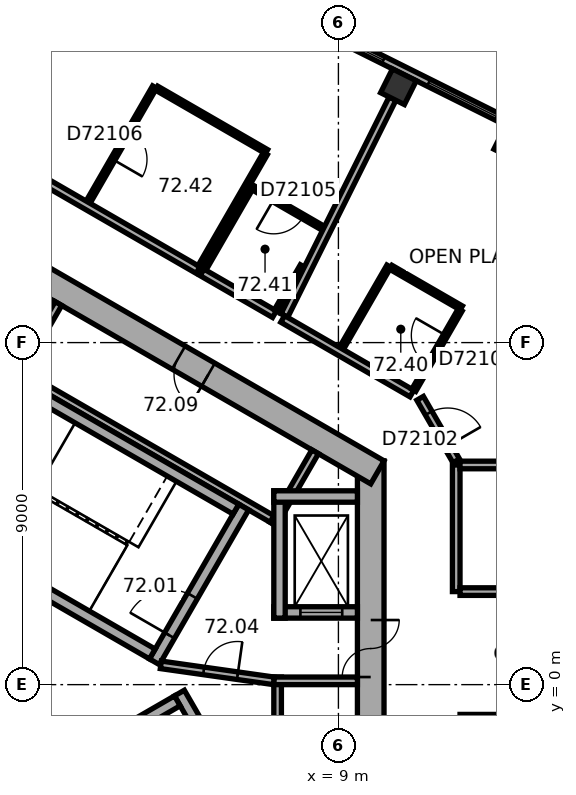
"""IFC4 building model, lengths in metres.
Left out: names, types, materials, properties, quantities, classifications, styles, units other than length and angle.
Written with IfcOpenShell. Run it as: python <this file> out.ifc"""

import sys

from ifc_helpers import new_model, si_unit, direction, frame, frame_2d, origin, origin_2d, place, context, subcontext, project, spatial, rectangle, extrude, element, fill, save


model = new_model("IFC4")
c1 = context("Model", 3, precision=1e-05, world=origin(), true_north=direction((0.0, 1.0)))
c2 = subcontext(c1, "Body", "Model", "MODEL_VIEW")
j1 = project(units=[si_unit("LENGTHUNIT", "METRE"), si_unit("PLANEANGLEUNIT", "RADIAN")], contexts=[c1])
p1 = place(None, origin())
s1 = spatial("IfcSite", under=j1, at=p1, CompositionType="ELEMENT")
p2 = place(p1, origin())
s2 = spatial("IfcBuilding", under=s1, at=p2, CompositionType="ELEMENT")
p3 = place(p2, frame((0.0, 0.0, 293.1)))
s3 = spatial("IfcBuildingStorey", under=s2, at=p3, CompositionType="ELEMENT", Elevation=293.1)
for number, where, z_axis, x_axis in (
    (1, (13.561, 14.246, 0.0), (0.0, 0.0, 1.0), (-0.895, 0.446, 0.0)),
    (2, (10.58, 15.732, 0.0), (0.0, 0.0, 1.0), (-0.895, 0.446, 0.0)),
):
    element("IfcColumn", number, at=place(p3, frame(where, z_axis=z_axis, x_axis=x_axis)), inside=s3, PredefinedType="COLUMN", context=c2, shape_type="SweptSolid", body=[
        extrude(rectangle(XDim=0.7, YDim=0.7, at=origin_2d()), origin(), (0.0, 0.0, 1.0), 3.7),
    ])
p4 = place(p3, frame((9.85, -5.889, 0.0), z_axis=(0.0, 0.0, 1.0), x_axis=(0.0, 1.0, 0.0)))
e3 = element("IfcWall", 3, at=p4, inside=s3, PredefinedType="SHEAR", context=c2, shape_type="SweptSolid", body=[
    extrude(rectangle(XDim=11.778, YDim=0.7, at=frame_2d((5.889, 0.0))), origin(), (0.0, 0.0, 1.0), 3.7),
])
p5 = place(p4, frame((6.089, 0.0, 0.0)))
e4 = element("IfcOpeningElement", 4, at=p5, cuts=e3, PredefinedType="OPENING", context=c2, shape_type="SweptSolid", body=[
    extrude(rectangle(XDim=1.5, YDim=2.1, at=frame_2d((0.75, 1.05))), frame((0.0, 0.36, 0.0), z_axis=(0.0, -1.0, 0.0), x_axis=(1.0, 0.0, 0.0)), (0.0, 0.0, 1.0), 0.72),
])
p6 = place(p4, frame((2.939, 0.0, 0.0)))
e5 = element("IfcOpeningElement", 5, at=p6, cuts=e3, PredefinedType="OPENING", context=c2, shape_type="SweptSolid", body=[
    extrude(rectangle(XDim=0.9, YDim=2.1, at=frame_2d((0.45, 1.05))), frame((0.0, 0.36, 0.0), z_axis=(0.0, -1.0, 0.0), x_axis=(1.0, 0.0, 0.0)), (0.0, 0.0, 1.0), 0.72),
])
p7 = place(p3, frame((10.025, 5.586, 0.0), z_axis=(0.0, 0.0, 1.0), x_axis=(-0.866026453023, 0.499998182661, 0.0)))
e6 = element("IfcWall", 6, at=p7, inside=s3, PredefinedType="SHEAR", context=c2, shape_type="SweptSolid", body=[
    extrude(rectangle(XDim=11.778, YDim=0.7, at=frame_2d((5.889, 0.0))), origin(), (0.0, 0.0, 1.0), 3.7),
])
p8 = place(p7, frame((5.139, 0.0, 0.0)))
e7 = element("IfcOpeningElement", 7, at=p8, cuts=e6, PredefinedType="OPENING", context=c2, shape_type="SweptSolid", body=[
    extrude(rectangle(XDim=0.9, YDim=2.1, at=frame_2d((0.45, 1.05))), frame((0.0, 0.36, 0.0), z_axis=(0.0, -1.0, 0.0), x_axis=(1.0, 0.0, 0.0)), (0.0, 0.0, 1.0), 0.72),
])
p9 = place(p3, frame((17.223, 12.923, 0.0), z_axis=(0.0, 0.0, 1.0), x_axis=(-0.894930561148, 0.44620543556, 0.0)))
e8 = element("IfcWall", 8, at=p9, inside=s3, PredefinedType="STANDARD", context=c2, shape_type="SweptSolid", body=[
    extrude(rectangle(XDim=17.731, YDim=0.2, at=frame_2d((8.866, 0.0))), origin(), (0.0, 0.0, 1.0), 3.7),
])
p10 = place(p9, frame((1.202, 0.0, 0.9)))
e9 = element("IfcOpeningElement", 9, at=p10, cuts=e8, PredefinedType="OPENING", context=c2, shape_type="SweptSolid", body=[
    extrude(rectangle(XDim=2.0, YDim=2.0, at=frame_2d((1.0, 1.0))), frame((0.0, 0.11, 0.0), z_axis=(0.0, -1.0, 0.0), x_axis=(1.0, 0.0, 0.0)), (0.0, 0.0, 1.0), 0.22),
])
p11 = place(p9, frame((4.533, 0.0, 0.9)))
e10 = element("IfcOpeningElement", 10, at=p11, cuts=e8, PredefinedType="OPENING", context=c2, shape_type="SweptSolid", body=[
    extrude(rectangle(XDim=2.0, YDim=2.0, at=frame_2d((1.0, 1.0))), frame((0.0, 0.11, 0.0), z_axis=(0.0, -1.0, 0.0), x_axis=(1.0, 0.0, 0.0)), (0.0, 0.0, 1.0), 0.22),
])
p12 = place(p9, frame((7.865, 0.0, 0.9)))
e11 = element("IfcOpeningElement", 11, at=p12, cuts=e8, PredefinedType="OPENING", context=c2, shape_type="SweptSolid", body=[
    extrude(rectangle(XDim=2.0, YDim=2.0, at=frame_2d((1.0, 1.0))), frame((0.0, 0.11, 0.0), z_axis=(0.0, -1.0, 0.0), x_axis=(1.0, 0.0, 0.0)), (0.0, 0.0, 1.0), 0.22),
])
p13 = place(p9, frame((11.197, 0.0, 0.9)))
e12 = element("IfcOpeningElement", 12, at=p13, cuts=e8, PredefinedType="OPENING", context=c2, shape_type="SweptSolid", body=[
    extrude(rectangle(XDim=2.0, YDim=2.0, at=frame_2d((1.0, 1.0))), frame((0.0, 0.11, 0.0), z_axis=(0.0, -1.0, 0.0), x_axis=(1.0, 0.0, 0.0)), (0.0, 0.0, 1.0), 0.22),
])
p14 = place(p9, frame((14.528, 0.0, 0.9)))
e13 = element("IfcOpeningElement", 13, at=p14, cuts=e8, PredefinedType="OPENING", context=c2, shape_type="SweptSolid", body=[
    extrude(rectangle(XDim=2.0, YDim=2.0, at=frame_2d((1.0, 1.0))), frame((0.0, 0.11, 0.0), z_axis=(0.0, -1.0, 0.0), x_axis=(1.0, 0.0, 0.0)), (0.0, 0.0, 1.0), 0.22),
])
p15 = place(p3, frame((7.4, -5.2, 0.0), z_axis=(0.0, 0.0, 1.0), x_axis=(0.0, 1.0, 0.0)))
e14 = element("IfcWall", 14, at=p15, inside=s3, PredefinedType="PARTITIONING", context=c2, shape_type="SweptSolid", body=[
    extrude(rectangle(XDim=5.4, YDim=0.2, at=frame_2d((2.7, 0.0))), origin(), (0.0, 0.0, 1.0), 3.42),
])
p16 = place(p3, frame((7.3, 0.1, 0.0), z_axis=(0.0, 0.0, 1.0), x_axis=(1.0, 0.0, 0.0)))
e15 = element("IfcWall", 15, at=p16, inside=s3, PredefinedType="PARTITIONING", context=c2, shape_type="SweptSolid", body=[
    extrude(rectangle(XDim=2.2, YDim=0.2, at=frame_2d((1.1, 0.0))), origin(), (0.0, 0.0, 1.0), 3.42),
])
p17 = place(p3, frame((7.424, 4.259, 0.0), z_axis=(0.0, 0.0, 1.0), x_axis=(-0.866026010844, 0.49999894854, 0.0)))
e16 = element("IfcWall", 16, at=p17, inside=s3, PredefinedType="PARTITIONING", context=c2, shape_type="SweptSolid", body=[
    extrude(rectangle(XDim=8.0, YDim=0.2, at=frame_2d((4.0, 0.0))), origin(), (0.0, 0.0, 1.0), 3.42),
])
for number, where, z_axis, x_axis in (
    (17, (7.287, 4.222, 0.0), (0.0, 0.0, 1.0), (0.5, 0.866, 0.0)),
    (18, (0.532, 8.122, 0.0), (0.0, 0.0, 1.0), (0.5, 0.866, 0.0)),
):
    element("IfcWall", number, at=place(p3, frame(where, z_axis=z_axis, x_axis=x_axis)), inside=s3, PredefinedType="PARTITIONING", context=c2, shape_type="SweptSolid", body=[
        extrude(rectangle(XDim=2.2, YDim=0.2, at=frame_2d((1.1, 0.0))), origin(), (0.0, 0.0, 1.0), 3.42),
    ])
p18 = place(p3, frame((4.158, 0.602, 0.0), z_axis=(0.0, 0.0, 1.0), x_axis=(0.499977259774, 0.866038532462, 0.0)))
e19 = element("IfcWall", 19, at=p18, inside=s3, PredefinedType="SHEAR", context=c2, shape_type="SweptSolid", body=[
    extrude(rectangle(XDim=4.7, YDim=0.3, at=frame_2d((2.35, 0.0))), origin(), (0.0, 0.0, 1.0), 3.42),
])
p19 = place(p18, frame((0.8, 0.0, 0.0)))
e20 = element("IfcOpeningElement", 20, at=p19, cuts=e19, PredefinedType="OPENING", context=c2, shape_type="SweptSolid", body=[
    extrude(rectangle(XDim=1.2, YDim=2.1, at=frame_2d((0.6, 1.05))), frame((0.0, 0.16, 0.0), z_axis=(0.0, -1.0, 0.0), x_axis=(1.0, 0.0, 0.0)), (0.0, 0.0, 1.0), 0.32),
])
for number, where, z_axis, x_axis in (
    (21, (4.103, 0.807, 0.0), (0.0, 0.0, 1.0), (-0.866, 0.5, 0.0)),
    (22, (6.303, 4.617, 0.0), (0.0, 0.0, 1.0), (-0.866, 0.5, 0.0)),
):
    element("IfcWall", number, at=place(p3, frame(where, z_axis=z_axis, x_axis=x_axis)), inside=s3, PredefinedType="SHEAR", context=c2, shape_type="SweptSolid", body=[
        extrude(rectangle(XDim=7.06, YDim=0.3, at=frame_2d((3.53, 0.0))), origin(), (0.0, 0.0, 1.0), 3.42),
    ])
p20 = place(p3, frame((4.816, -0.222, 0.0), z_axis=(0.0, 0.0, 1.0), x_axis=(0.499977259774, -0.866038532462, 0.0)))
e23 = element("IfcWall", 23, at=p20, inside=s3, PredefinedType="SHEAR", context=c2, shape_type="SweptSolid", body=[
    extrude(rectangle(XDim=4.7, YDim=0.3, at=frame_2d((2.35, 0.0))), origin(), (0.0, 0.0, 1.0), 3.42),
])
p21 = place(p3, frame((-1.353, -3.957, 0.0), z_axis=(0.0, 0.0, 1.0), x_axis=(0.866027801685, 0.499995846692, 0.0)))
e24 = element("IfcWall", 24, at=p21, inside=s3, PredefinedType="SHEAR", context=c2, shape_type="SweptSolid", body=[
    extrude(rectangle(XDim=7.06, YDim=0.3, at=frame_2d((3.53, 0.0))), origin(), (0.0, 0.0, 1.0), 3.42),
])
p22 = place(p3, frame((7.3, 1.9, 0.0), z_axis=(0.0, 0.0, 1.0), x_axis=(1.0, 0.0, 0.0)))
e25 = element("IfcWall", 25, at=p22, inside=s3, PredefinedType="SHEAR", context=c2, shape_type="SweptSolid", body=[
    extrude(rectangle(XDim=2.2, YDim=0.3, at=frame_2d((1.1, 0.0))), origin(), (0.0, 0.0, 1.0), 3.42),
])
p23 = place(p22, frame((0.7, 0.0, 0.0)))
e26 = element("IfcOpeningElement", 26, at=p23, cuts=e25, PredefinedType="OPENING", context=c2, shape_type="SweptSolid", body=[
    extrude(rectangle(XDim=1.1, YDim=2.1, at=frame_2d((0.55, 1.05))), frame((0.0, 0.16, 0.0), z_axis=(0.0, -1.0, 0.0), x_axis=(1.0, 0.0, 0.0)), (0.0, 0.0, 1.0), 0.32),
])
p24 = place(p3, frame((7.45, 1.75, 0.0), z_axis=(0.0, 0.0, 1.0), x_axis=(0.0, 1.0, 0.0)))
e27 = element("IfcWall", 27, at=p24, inside=s3, PredefinedType="SHEAR", context=c2, shape_type="SweptSolid", body=[
    extrude(rectangle(XDim=3.35, YDim=0.3, at=frame_2d((1.675, 0.0))), origin(), (0.0, 0.0, 1.0), 3.42),
])
p25 = place(p3, frame((7.3, 4.95, 0.0), z_axis=(0.0, 0.0, 1.0), x_axis=(1.0, 0.0, 0.0)))
e28 = element("IfcWall", 28, at=p25, inside=s3, PredefinedType="SHEAR", context=c2, shape_type="SweptSolid", body=[
    extrude(rectangle(XDim=2.2, YDim=0.3, at=frame_2d((1.1, 0.0))), origin(), (0.0, 0.0, 1.0), 3.42),
])
p26 = place(p3, frame((4.327, 0.521, 0.0), z_axis=(0.0, 0.0, 1.0), x_axis=(0.990124376366, -0.14019172346, 0.0)))
e29 = element("IfcWall", 29, at=p26, inside=s3, PredefinedType="PARTITIONING", context=c2, shape_type="SweptSolid", body=[
    extrude(rectangle(XDim=3.002, YDim=0.2, at=frame_2d((1.501, 0.0))), origin(), (0.0, 0.0, 1.0), 3.42),
])
p27 = place(p26, frame((1.138, 0.0, 0.0)))
e30 = element("IfcOpeningElement", 30, at=p27, cuts=e29, PredefinedType="OPENING", context=c2, shape_type="SweptSolid", body=[
    extrude(rectangle(XDim=0.9, YDim=2.1, at=frame_2d((0.45, 1.05))), frame((0.0, 0.11, 0.0), z_axis=(0.0, -1.0, 0.0), x_axis=(1.0, 0.0, 0.0)), (0.0, 0.0, 1.0), 0.22),
])
p28 = place(p3, frame((2.413, 12.694, 0.0), z_axis=(0.0, 0.0, 1.0), x_axis=(0.500010275428, 0.866019471182, 0.0)))
e31 = element("IfcWall", 31, at=p28, inside=s3, PredefinedType="PARTITIONING", context=c2, shape_type="SweptSolid", body=[
    extrude(rectangle(XDim=3.5, YDim=0.12, at=frame_2d((1.75, 0.0))), origin(), (0.0, 0.0, 1.0), 3.42),
])
p29 = place(p28, frame((1.3, 0.0, 0.0)))
e32 = element("IfcOpeningElement", 32, at=p29, cuts=e31, PredefinedType="OPENING", context=c2, shape_type="SweptSolid", body=[
    extrude(rectangle(XDim=0.9, YDim=2.1, at=frame_2d((0.45, 1.05))), frame((0.0, 0.07, 0.0), z_axis=(0.0, -1.0, 0.0), x_axis=(1.0, 0.0, 0.0)), (0.0, 0.0, 1.0), 0.14),
])
p30 = place(p3, frame((4.215, 15.695, 0.0), z_axis=(0.0, 0.0, 1.0), x_axis=(0.865989591418, -0.50006202371, 0.0)))
e33 = element("IfcWall", 33, at=p30, inside=s3, PredefinedType="PARTITIONING", context=c2, shape_type="SweptSolid", body=[
    extrude(rectangle(XDim=3.34, YDim=0.12, at=frame_2d((1.67, 0.0))), origin(), (0.0, 0.0, 1.0), 3.42),
])
p31 = place(p3, frame((5.308, 10.907, 0.0), z_axis=(0.0, 0.0, 1.0), x_axis=(-0.866028394472, 0.499994819941, 0.0)))
e34 = element("IfcWall", 34, at=p31, inside=s3, PredefinedType="PARTITIONING", context=c2, shape_type="SweptSolid", body=[
    extrude(rectangle(XDim=4.992, YDim=0.2, at=frame_2d((2.496, 0.0))), origin(), (0.0, 0.0, 1.0), 3.42),
])
p32 = place(p3, frame((5.461, 10.934, 0.0), z_axis=(0.0, 0.0, 1.0), x_axis=(0.500004234368, 0.866022959057, 0.0)))
e35 = element("IfcWall", 35, at=p32, inside=s3, PredefinedType="PARTITIONING", context=c2, shape_type="SweptSolid", body=[
    extrude(rectangle(XDim=2.5, YDim=0.12, at=frame_2d((1.25, 0.0))), origin(), (0.0, 0.0, 1.0), 3.42),
])
p33 = place(p3, frame((6.763, 13.069, 0.0), z_axis=(0.0, 0.0, 1.0), x_axis=(0.866019511163, -0.500010206181, 0.0)))
e36 = element("IfcWall", 36, at=p33, inside=s3, PredefinedType="PARTITIONING", context=c2, shape_type="SweptSolid", body=[
    extrude(rectangle(XDim=2.13, YDim=0.12, at=frame_2d((1.065, 0.0))), origin(), (0.0, 0.0, 1.0), 3.42),
])
p34 = place(p33, frame((0.615, 0.0, 0.0)))
e37 = element("IfcOpeningElement", 37, at=p34, cuts=e36, PredefinedType="OPENING", context=c2, shape_type="SweptSolid", body=[
    extrude(rectangle(XDim=0.9, YDim=2.1, at=frame_2d((0.45, 1.05))), frame((0.0, 0.07, 0.0), z_axis=(0.0, -1.0, 0.0), x_axis=(1.0, 0.0, 0.0)), (0.0, 0.0, 1.0), 0.14),
])
p35 = place(p3, frame((7.077, 13.973, 0.0), z_axis=(0.0, 0.0, 1.0), x_axis=(-0.499955923987, -0.866050849587, 0.0)))
e38 = element("IfcWall", 38, at=p35, inside=s3, PredefinedType="PARTITIONING", context=c2, shape_type="SweptSolid", body=[
    extrude(rectangle(XDim=3.44, YDim=0.12, at=frame_2d((1.72, 0.0))), origin(), (0.0, 0.0, 1.0), 3.42),
])
p36 = place(p3, frame((7.317, 9.748, 0.0), z_axis=(0.0, 0.0, 1.0), x_axis=(-0.866028486751, 0.499994660107, 0.0)))
e39 = element("IfcWall", 39, at=p36, inside=s3, PredefinedType="PARTITIONING", context=c2, shape_type="SweptSolid", body=[
    extrude(rectangle(XDim=2.2, YDim=0.2, at=frame_2d((1.1, 0.0))), origin(), (0.0, 0.0, 1.0), 3.42),
])
p37 = place(p3, frame((8.051, 11.019, 0.0), z_axis=(0.0, 0.0, 1.0), x_axis=(-0.500093228334, -0.86597157169, 0.0)))
e40 = element("IfcWall", 40, at=p37, inside=s3, PredefinedType="PARTITIONING", context=c2, shape_type="SweptSolid", body=[
    extrude(rectangle(XDim=1.368, YDim=0.12, at=frame_2d((0.684, 0.0))), origin(), (0.0, 0.0, 1.0), 3.42),
])
p38 = place(p3, frame((9.078, 8.846, 0.0), z_axis=(0.0, 0.0, 1.0), x_axis=(0.500004234368, 0.866022959057, 0.0)))
e41 = element("IfcWall", 41, at=p38, inside=s3, PredefinedType="PARTITIONING", context=c2, shape_type="SweptSolid", body=[
    extrude(rectangle(XDim=2.5, YDim=0.12, at=frame_2d((1.25, 0.0))), origin(), (0.0, 0.0, 1.0), 3.42),
])
p39 = place(p3, frame((10.38, 10.981, 0.0), z_axis=(0.0, 0.0, 1.0), x_axis=(0.86600889856, -0.500028586798, 0.0)))
e42 = element("IfcWall", 42, at=p39, inside=s3, PredefinedType="PARTITIONING", context=c2, shape_type="SweptSolid", body=[
    extrude(rectangle(XDim=2.14, YDim=0.12, at=frame_2d((1.07, 0.0))), origin(), (0.0, 0.0, 1.0), 3.42),
])
p40 = place(p3, frame((10.423, 15.419, 0.0), z_axis=(0.0, 0.0, 1.0), x_axis=(-0.446202606517, -0.894931971681, 0.0)))
e43 = element("IfcWall", 43, at=p40, inside=s3, PredefinedType="PARTITIONING", context=c2, shape_type="SweptSolid", body=[
    extrude(rectangle(XDim=6.377, YDim=0.2, at=frame_2d((3.188, 0.0))), origin(), (0.0, 0.0, 1.0), 2.87),
])
p41 = place(p3, frame((10.934, 7.659, 0.0), z_axis=(0.0, 0.0, 1.0), x_axis=(-0.866034411203, 0.499984398369, 0.0)))
e44 = element("IfcWall", 44, at=p41, inside=s3, PredefinedType="PARTITIONING", context=c2, shape_type="SweptSolid", body=[
    extrude(rectangle(XDim=3.927, YDim=0.2, at=frame_2d((1.963, 0.0))), origin(), (0.0, 0.0, 1.0), 3.42),
])
p42 = place(p3, frame((12.1, 2.448, 0.0), z_axis=(0.0, 0.0, 1.0), x_axis=(0.0, 1.0, 0.0)))
e45 = element("IfcWall", 45, at=p42, inside=s3, PredefinedType="PARTITIONING", context=c2, shape_type="SweptSolid", body=[
    extrude(rectangle(XDim=3.332, YDim=0.2, at=frame_2d((1.666, 0.0))), origin(), (0.0, 0.0, 1.0), 3.42),
])
p43 = place(p3, frame((12.1, 5.889, 0.0), z_axis=(0.0, 0.0, 1.0), x_axis=(-0.500063520245, 0.865988727248, 0.0)))
e46 = element("IfcWall", 46, at=p43, inside=s3, PredefinedType="PARTITIONING", context=c2, shape_type="SweptSolid", body=[
    extrude(rectangle(XDim=1.9, YDim=0.2, at=frame_2d((0.95, 0.0))), origin(), (0.0, 0.0, 1.0), 3.42),
])
p44 = place(p43, frame((0.45, 0.0, 0.0)))
e47 = element("IfcOpeningElement", 47, at=p44, cuts=e46, PredefinedType="OPENING", context=c2, shape_type="SweptSolid", body=[
    extrude(rectangle(XDim=1.0, YDim=2.1, at=frame_2d((0.5, 1.05))), frame((0.0, 0.11, 0.0), z_axis=(0.0, -1.0, 0.0), x_axis=(1.0, 0.0, 0.0)), (0.0, 0.0, 1.0), 0.22),
])
p45 = place(p3, frame((12.2, -0.883, 0.0), z_axis=(0.0, 0.0, 1.0), x_axis=(1.0, 0.0, 0.0)))
e48 = element("IfcWall", 48, at=p45, inside=s3, PredefinedType="PARTITIONING", context=c2, shape_type="SweptSolid", body=[
    extrude(rectangle(XDim=6.25, YDim=0.2, at=frame_2d((3.125, 0.0))), origin(), (0.0, 0.0, 1.0), 2.87),
])
p46 = place(p45, frame((2.625, 0.0, 0.0)))
e49 = element("IfcOpeningElement", 49, at=p46, cuts=e48, PredefinedType="OPENING", context=c2, shape_type="SweptSolid", body=[
    extrude(rectangle(XDim=1.0, YDim=2.1, at=frame_2d((0.5, 1.05))), frame((0.0, 0.11, 0.0), z_axis=(0.0, -1.0, 0.0), x_axis=(1.0, 0.0, 0.0)), (0.0, 0.0, 1.0), 0.22),
])
p47 = place(p3, frame((12.204, 9.859, 0.0), z_axis=(0.0, 0.0, 1.0), x_axis=(-0.500077547548, -0.865980627057, 0.0)))
e50 = element("IfcWall", 50, at=p47, inside=s3, PredefinedType="PARTITIONING", context=c2, shape_type="SweptSolid", body=[
    extrude(rectangle(XDim=2.44, YDim=0.12, at=frame_2d((1.22, 0.0))), origin(), (0.0, 0.0, 1.0), 3.42),
])
p48 = place(p47, frame((0.77, 0.0, 0.0)))
e51 = element("IfcOpeningElement", 51, at=p48, cuts=e50, PredefinedType="OPENING", context=c2, shape_type="SweptSolid", body=[
    extrude(rectangle(XDim=0.9, YDim=2.1, at=frame_2d((0.45, 1.05))), frame((0.0, 0.07, 0.0), z_axis=(0.0, -1.0, 0.0), x_axis=(1.0, 0.0, 0.0)), (0.0, 0.0, 1.0), 0.14),
])
p49 = place(p3, frame((18.45, 2.448, 0.0), z_axis=(0.0, 0.0, 1.0), x_axis=(-1.0, 0.0, 0.0)))
e52 = element("IfcWall", 52, at=p49, inside=s3, PredefinedType="PARTITIONING", context=c2, shape_type="SweptSolid", body=[
    extrude(rectangle(XDim=6.25, YDim=0.2, at=frame_2d((3.125, 0.0))), origin(), (0.0, 0.0, 1.0), 3.42),
])
p50 = place(p49, frame((2.625, 0.0, 0.0)))
e53 = element("IfcOpeningElement", 53, at=p50, cuts=e52, PredefinedType="OPENING", context=c2, shape_type="SweptSolid", body=[
    extrude(rectangle(XDim=1.0, YDim=2.1, at=frame_2d((0.5, 1.05))), frame((0.0, 0.11, 0.0), z_axis=(0.0, -1.0, 0.0), x_axis=(1.0, 0.0, 0.0)), (0.0, 0.0, 1.0), 0.22),
])
p51 = place(p3, frame((18.45, 5.78, 0.0), z_axis=(0.0, 0.0, 1.0), x_axis=(-1.0, 0.0, 0.0)))
e54 = element("IfcWall", 54, at=p51, inside=s3, PredefinedType="PARTITIONING", context=c2, shape_type="SweptSolid", body=[
    extrude(rectangle(XDim=6.25, YDim=0.2, at=frame_2d((3.125, 0.0))), origin(), (0.0, 0.0, 1.0), 3.42),
])
p52 = place(p11, origin())
e55 = element("IfcWindow", 55, at=p52, inside=s3, PartitioningType="SINGLE_PANEL", PredefinedType="WINDOW", context=c2, shape_type="SweptSolid", body=[
    extrude(rectangle(XDim=2.0, YDim=2.0, at=frame_2d((1.0, 1.0))), frame((0.0, 0.03, 0.0), z_axis=(0.0, -1.0, 0.0), x_axis=(1.0, 0.0, 0.0)), (0.0, 0.0, 1.0), 0.06),
])
fill(e10, e55)
p53 = place(p12, origin())
e56 = element("IfcWindow", 56, at=p53, inside=s3, PartitioningType="SINGLE_PANEL", PredefinedType="WINDOW", context=c2, shape_type="SweptSolid", body=[
    extrude(rectangle(XDim=2.0, YDim=2.0, at=frame_2d((1.0, 1.0))), frame((0.0, 0.03, 0.0), z_axis=(0.0, -1.0, 0.0), x_axis=(1.0, 0.0, 0.0)), (0.0, 0.0, 1.0), 0.06),
])
fill(e11, e56)
p54 = place(p5, origin())
e57 = element("IfcDoor", 57, at=p54, inside=s3, OperationType="DOUBLE_DOOR_SINGLE_SWING", PredefinedType="DOOR", context=c2, shape_type="SweptSolid", body=[
    extrude(rectangle(XDim=1.5, YDim=2.1, at=frame_2d((0.75, 1.05))), frame((0.0, 0.025, 0.0), z_axis=(0.0, -1.0, 0.0), x_axis=(1.0, 0.0, 0.0)), (0.0, 0.0, 1.0), 0.05),
])
fill(e4, e57)
p55 = place(p19, origin())
e58 = element("IfcDoor", 58, at=p55, inside=s3, OperationType="SINGLE_SWING_RIGHT", PredefinedType="DOOR", context=c2, shape_type="SweptSolid", body=[
    extrude(rectangle(XDim=1.2, YDim=2.1, at=frame_2d((0.6, 1.05))), frame((0.0, 0.025, 0.0), z_axis=(0.0, -1.0, 0.0), x_axis=(1.0, 0.0, 0.0)), (0.0, 0.0, 1.0), 0.05),
])
fill(e20, e58)
p56 = place(p27, origin())
e59 = element("IfcDoor", 59, at=p56, inside=s3, OperationType="SINGLE_SWING_LEFT", PredefinedType="DOOR", context=c2, shape_type="SweptSolid", body=[
    extrude(rectangle(XDim=0.9, YDim=2.1, at=frame_2d((0.45, 1.05))), frame((0.0, 0.025, 0.0), z_axis=(0.0, -1.0, 0.0), x_axis=(1.0, 0.0, 0.0)), (0.0, 0.0, 1.0), 0.05),
])
fill(e30, e59)
p57 = place(p8, origin())
e60 = element("IfcDoor", 60, at=p57, inside=s3, OperationType="SINGLE_SWING_LEFT", PredefinedType="DOOR", context=c2, shape_type="SweptSolid", body=[
    extrude(rectangle(XDim=0.9, YDim=2.1, at=frame_2d((0.45, 1.05))), frame((0.0, 0.025, 0.0), z_axis=(0.0, -1.0, 0.0), x_axis=(1.0, 0.0, 0.0)), (0.0, 0.0, 1.0), 0.05),
])
fill(e7, e60)
p58 = place(p23, origin())
e61 = element("IfcDoor", 61, at=p58, inside=s3, OperationType="DOUBLE_DOOR_SLIDING", PredefinedType="DOOR", context=c2, shape_type="SweptSolid", body=[
    extrude(rectangle(XDim=1.1, YDim=2.1, at=frame_2d((0.55, 1.05))), frame((0.0, 0.025, 0.0), z_axis=(0.0, -1.0, 0.0), x_axis=(1.0, 0.0, 0.0)), (0.0, 0.0, 1.0), 0.05),
])
fill(e26, e61)
p59 = place(p44, origin())
e62 = element("IfcDoor", 62, at=p59, inside=s3, OperationType="SINGLE_SWING_LEFT", PredefinedType="DOOR", context=c2, shape_type="SweptSolid", body=[
    extrude(rectangle(XDim=1.0, YDim=2.1, at=frame_2d((0.5, 1.05))), frame((0.0, 0.025, 0.0), z_axis=(0.0, -1.0, 0.0), x_axis=(1.0, 0.0, 0.0)), (0.0, 0.0, 1.0), 0.05),
])
fill(e47, e62)
p60 = place(p48, origin())
e63 = element("IfcDoor", 63, at=p60, inside=s3, OperationType="SINGLE_SWING_LEFT", PredefinedType="DOOR", context=c2, shape_type="SweptSolid", body=[
    extrude(rectangle(XDim=0.9, YDim=2.1, at=frame_2d((0.45, 1.05))), frame((0.0, 0.025, 0.0), z_axis=(0.0, -1.0, 0.0), x_axis=(1.0, 0.0, 0.0)), (0.0, 0.0, 1.0), 0.05),
])
fill(e51, e63)
p61 = place(p34, origin())
e64 = element("IfcDoor", 64, at=p61, inside=s3, OperationType="SINGLE_SWING_LEFT", PredefinedType="DOOR", context=c2, shape_type="SweptSolid", body=[
    extrude(rectangle(XDim=0.9, YDim=2.1, at=frame_2d((0.45, 1.05))), frame((0.0, 0.025, 0.0), z_axis=(0.0, -1.0, 0.0), x_axis=(1.0, 0.0, 0.0)), (0.0, 0.0, 1.0), 0.05),
])
fill(e37, e64)
p62 = place(p29, origin())
e65 = element("IfcDoor", 65, at=p62, inside=s3, OperationType="SINGLE_SWING_LEFT", PredefinedType="DOOR", context=c2, shape_type="SweptSolid", body=[
    extrude(rectangle(XDim=0.9, YDim=2.1, at=frame_2d((0.45, 1.05))), frame((0.0, 0.025, 0.0), z_axis=(0.0, -1.0, 0.0), x_axis=(1.0, 0.0, 0.0)), (0.0, 0.0, 1.0), 0.05),
])
fill(e32, e65)
save(model, sys.argv[1])
